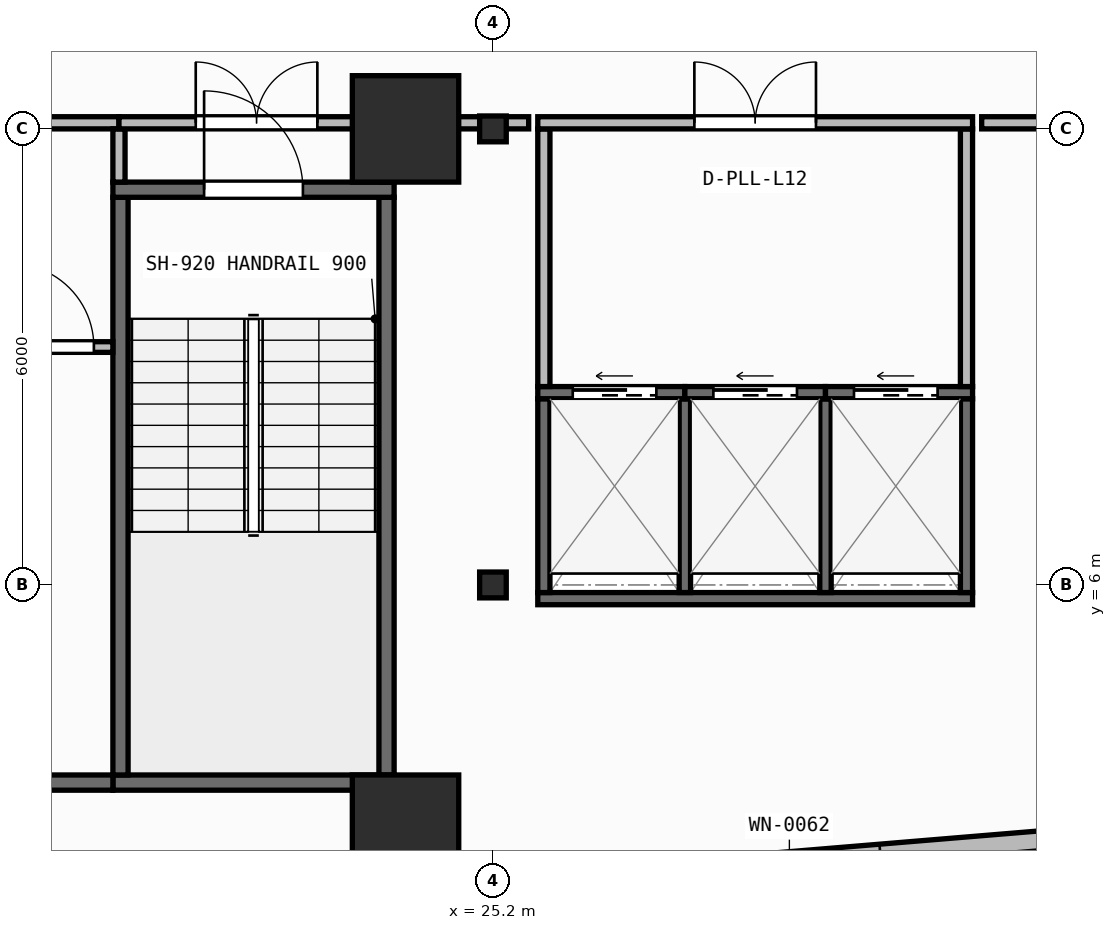
"""IFC4 building model, lengths in metres.
Left out: names, types, materials, properties, quantities, classifications, styles, units other than length and angle.
Written with IfcOpenShell. Run it as: python <this file> out.ifc"""

import sys

from ifc_helpers import new_model, si_unit, direction, frame, frame_2d, origin, origin_2d, place, context, subcontext, project, spatial, rectangle, i_section, extrude, element, fill, save


model = new_model("IFC4")
c1 = context("Model", 3, precision=1e-05, world=origin(), true_north=direction((0.0, 1.0)))
c2 = subcontext(c1, "Body", "Model", "MODEL_VIEW")
j1 = project(units=[si_unit("LENGTHUNIT", "METRE"), si_unit("PLANEANGLEUNIT", "RADIAN")], contexts=[c1])
p1 = place(None, origin())
s1 = spatial("IfcSite", under=j1, at=p1, CompositionType="ELEMENT")
p2 = place(p1, origin())
s2 = spatial("IfcBuilding", under=s1, at=p2, CompositionType="ELEMENT")
p3 = place(p2, frame((0.0, 0.0, 50.15)))
s3 = spatial("IfcBuildingStorey", under=s2, at=p3, CompositionType="ELEMENT", Elevation=50.15)
p4 = place(p3, frame((24.05, 2.8, 0.0), z_axis=(0.0, 0.0, 1.0), x_axis=(1.0, 0.0, 0.0)))
e1 = element("IfcColumn", 1, at=p4, inside=s3, PredefinedType="COLUMN", context=c2, shape_type="SweptSolid", body=[
    extrude(rectangle(XDim=1.4, YDim=1.4, at=origin_2d()), origin(), (0.0, 0.0, 1.0), 3.95),
])
p5 = place(p3, frame((25.2, 6.0, 0.0), z_axis=(0.0, 0.0, 1.0), x_axis=(1.0, 0.0, 0.0)))
e2 = element("IfcColumn", 2, at=p5, inside=s3, PredefinedType="COLUMN", context=c2, shape_type="SweptSolid", body=[
    extrude(i_section(OverallWidth=0.35, OverallDepth=0.34, WebThickness=0.016, FlangeThickness=0.028, at=origin_2d()), origin(), (0.0, 0.0, 1.0), 3.95),
])
p6 = place(p3, frame((24.05, 12.0, 0.0), z_axis=(0.0, 0.0, 1.0), x_axis=(1.0, 0.0, 0.0)))
e3 = element("IfcColumn", 3, at=p6, inside=s3, PredefinedType="COLUMN", context=c2, shape_type="SweptSolid", body=[
    extrude(rectangle(XDim=1.4, YDim=1.4, at=origin_2d()), origin(), (0.0, 0.0, 1.0), 3.95),
])
p7 = place(p3, frame((25.2, 12.0, 0.0), z_axis=(0.0, 0.0, 1.0), x_axis=(1.0, 0.0, 0.0)))
e4 = element("IfcColumn", 4, at=p7, inside=s3, PredefinedType="COLUMN", context=c2, shape_type="SweptSolid", body=[
    extrude(i_section(OverallWidth=0.35, OverallDepth=0.34, WebThickness=0.016, FlangeThickness=0.028, at=origin_2d()), origin(), (0.0, 0.0, 1.0), 3.95),
])
p8 = place(p3, frame((2.76, 0.174, 0.0), z_axis=(0.0, 0.0, 1.0), x_axis=(0.996571478456, 0.082736257641, 0.0)))
e5 = element("IfcWall", 5, at=p8, inside=s3, PredefinedType="STANDARD", context=c2, shape_type="SweptSolid", body=[
    extrude(rectangle(XDim=52.861, YDim=0.26, at=frame_2d((26.431, 0.0))), origin(), (0.0, 0.0, 1.0), 3.71),
])
p9 = place(p8, frame((25.231, 0.0, 0.9)))
e6 = element("IfcOpeningElement", 6, at=p9, cuts=e5, PredefinedType="OPENING", context=c2, shape_type="SweptSolid", body=[
    extrude(rectangle(XDim=2.4, YDim=1.65, at=frame_2d((1.2, 0.825))), frame((0.0, 0.14, 0.0), z_axis=(0.0, -1.0, 0.0), x_axis=(1.0, 0.0, 0.0)), (0.0, 0.0, 1.0), 0.28),
])
p10 = place(p3, frame((20.2, 3.4, 0.0), z_axis=(0.0, 0.0, 1.0), x_axis=(1.0, 0.0, 0.0)))
e7 = element("IfcWall", 7, at=p10, inside=s3, PredefinedType="SHEAR", context=c2, shape_type="SweptSolid", body=[
    extrude(rectangle(XDim=3.7, YDim=0.2, at=frame_2d((1.85, 0.0))), origin(), (0.0, 0.0, 1.0), 3.71),
])
for number, where, z_axis, x_axis in (
    (8, (20.3, 3.5, 0.0), (0.0, 0.0, 1.0), (0.0, 1.0, 0.0)),
    (9, (23.8, 3.5, 0.0), (0.0, 0.0, 1.0), (0.0, 1.0, 0.0)),
):
    element("IfcWall", number, at=place(p3, frame(where, z_axis=z_axis, x_axis=x_axis)), inside=s3, PredefinedType="SHEAR", context=c2, shape_type="SweptSolid", body=[
        extrude(rectangle(XDim=7.6, YDim=0.2, at=frame_2d((3.8, 0.0))), origin(), (0.0, 0.0, 1.0), 3.71),
    ])
p11 = place(p3, frame((20.2, 11.2, 0.0), z_axis=(0.0, 0.0, 1.0), x_axis=(1.0, 0.0, 0.0)))
e10 = element("IfcWall", 10, at=p11, inside=s3, PredefinedType="SHEAR", context=c2, shape_type="SweptSolid", body=[
    extrude(rectangle(XDim=3.7, YDim=0.2, at=frame_2d((1.85, 0.0))), origin(), (0.0, 0.0, 1.0), 3.71),
])
p12 = place(p11, frame((1.2, 0.0, 0.0)))
e11 = element("IfcOpeningElement", 11, at=p12, cuts=e10, PredefinedType="OPENING", context=c2, shape_type="SweptSolid", body=[
    extrude(rectangle(XDim=1.3, YDim=2.15, at=frame_2d((0.65, 1.075))), frame((0.0, 0.11, 0.0), z_axis=(0.0, -1.0, 0.0), x_axis=(1.0, 0.0, 0.0)), (0.0, 0.0, 1.0), 0.22),
])
p13 = place(p3, frame((6.5, 3.4, 0.0), z_axis=(0.0, 0.0, 1.0), x_axis=(1.0, 0.0, 0.0)))
e12 = element("IfcWall", 12, at=p13, inside=s3, PredefinedType="SHEAR", context=c2, shape_type="SweptSolid", body=[
    extrude(rectangle(XDim=13.7, YDim=0.2, at=frame_2d((6.85, 0.0))), origin(), (0.0, 0.0, 1.0), 3.71),
])
p14 = place(p3, frame((25.79, 5.82, 0.0), z_axis=(0.0, 0.0, 1.0), x_axis=(1.0, 0.0, 0.0)))
e13 = element("IfcWall", 13, at=p14, inside=s3, PredefinedType="SHEAR", context=c2, shape_type="SweptSolid", body=[
    extrude(rectangle(XDim=5.72, YDim=0.16, at=frame_2d((2.86, 0.0))), origin(), (0.0, 0.0, 1.0), 3.71),
])
for number, where, z_axis, x_axis in (
    (14, (25.87, 5.9, 0.0), (0.0, 0.0, 1.0), (0.0, 1.0, 0.0)),
    (15, (31.43, 5.9, 0.0), (0.0, 0.0, 1.0), (0.0, 1.0, 0.0)),
):
    element("IfcWall", number, at=place(p3, frame(where, z_axis=z_axis, x_axis=x_axis)), inside=s3, PredefinedType="SHEAR", context=c2, shape_type="SweptSolid", body=[
        extrude(rectangle(XDim=2.55, YDim=0.16, at=frame_2d((1.275, 0.0))), origin(), (0.0, 0.0, 1.0), 3.71),
    ])
for number, where, z_axis, x_axis in (
    (16, (27.725, 5.9, 0.0), (0.0, 0.0, 1.0), (0.0, 1.0, 0.0)),
    (17, (29.575, 5.9, 0.0), (0.0, 0.0, 1.0), (0.0, 1.0, 0.0)),
):
    element("IfcWall", number, at=place(p3, frame(where, z_axis=z_axis, x_axis=x_axis)), inside=s3, PredefinedType="SHEAR", context=c2, shape_type="SweptSolid", body=[
        extrude(rectangle(XDim=2.55, YDim=0.15, at=frame_2d((1.275, 0.0))), origin(), (0.0, 0.0, 1.0), 3.71),
    ])
p15 = place(p3, frame((25.79, 8.53, 0.0), z_axis=(0.0, 0.0, 1.0), x_axis=(1.0, 0.0, 0.0)))
e18 = element("IfcWall", 18, at=p15, inside=s3, PredefinedType="SHEAR", context=c2, shape_type="SweptSolid", body=[
    extrude(rectangle(XDim=1.935, YDim=0.16, at=frame_2d((0.968, 0.0))), origin(), (0.0, 0.0, 1.0), 3.71),
])
p16 = place(p15, frame((0.46, 0.0, 0.0)))
e19 = element("IfcOpeningElement", 19, at=p16, cuts=e18, PredefinedType="OPENING", context=c2, shape_type="SweptSolid", body=[
    extrude(rectangle(XDim=1.1, YDim=2.15, at=frame_2d((0.55, 1.075))), frame((0.0, 0.09, 0.0), z_axis=(0.0, -1.0, 0.0), x_axis=(1.0, 0.0, 0.0)), (0.0, 0.0, 1.0), 0.18),
])
p17 = place(p3, frame((27.725, 8.53, 0.0), z_axis=(0.0, 0.0, 1.0), x_axis=(1.0, 0.0, 0.0)))
e20 = element("IfcWall", 20, at=p17, inside=s3, PredefinedType="SHEAR", context=c2, shape_type="SweptSolid", body=[
    extrude(rectangle(XDim=1.85, YDim=0.16, at=frame_2d((0.925, 0.0))), origin(), (0.0, 0.0, 1.0), 3.71),
])
p18 = place(p17, frame((0.375, 0.0, 0.0)))
e21 = element("IfcOpeningElement", 21, at=p18, cuts=e20, PredefinedType="OPENING", context=c2, shape_type="SweptSolid", body=[
    extrude(rectangle(XDim=1.1, YDim=2.15, at=frame_2d((0.55, 1.075))), frame((0.0, 0.09, 0.0), z_axis=(0.0, -1.0, 0.0), x_axis=(1.0, 0.0, 0.0)), (0.0, 0.0, 1.0), 0.18),
])
p19 = place(p3, frame((29.575, 8.53, 0.0), z_axis=(0.0, 0.0, 1.0), x_axis=(1.0, 0.0, 0.0)))
e22 = element("IfcWall", 22, at=p19, inside=s3, PredefinedType="SHEAR", context=c2, shape_type="SweptSolid", body=[
    extrude(rectangle(XDim=1.935, YDim=0.16, at=frame_2d((0.968, 0.0))), origin(), (0.0, 0.0, 1.0), 3.71),
])
p20 = place(p19, frame((0.375, 0.0, 0.0)))
e23 = element("IfcOpeningElement", 23, at=p20, cuts=e22, PredefinedType="OPENING", context=c2, shape_type="SweptSolid", body=[
    extrude(rectangle(XDim=1.1, YDim=2.15, at=frame_2d((0.55, 1.075))), frame((0.0, 0.09, 0.0), z_axis=(0.0, -1.0, 0.0), x_axis=(1.0, 0.0, 0.0)), (0.0, 0.0, 1.0), 0.18),
])
p21 = place(p3, frame((18.61, 9.13, 0.0), z_axis=(0.0, 0.0, 1.0), x_axis=(1.0, 0.0, 0.0)))
e24 = element("IfcWall", 24, at=p21, inside=s3, PredefinedType="PARTITIONING", context=c2, shape_type="SweptSolid", body=[
    extrude(rectangle(XDim=1.59, YDim=0.14, at=frame_2d((0.795, 0.0))), origin(), (0.0, 0.0, 1.0), 3.71),
])
p22 = place(p21, frame((0.24, 0.0, 0.0)))
e25 = element("IfcOpeningElement", 25, at=p22, cuts=e24, PredefinedType="OPENING", context=c2, shape_type="SweptSolid", body=[
    extrude(rectangle(XDim=1.1, YDim=2.1, at=frame_2d((0.55, 1.05))), frame((0.0, 0.08, 0.0), z_axis=(0.0, -1.0, 0.0), x_axis=(1.0, 0.0, 0.0)), (0.0, 0.0, 1.0), 0.16),
])
p23 = place(p3, frame((12.58, 12.08, 0.0), z_axis=(0.0, 0.0, 1.0), x_axis=(1.0, 0.0, 0.0)))
e26 = element("IfcWall", 26, at=p23, inside=s3, PredefinedType="PARTITIONING", context=c2, shape_type="SweptSolid", body=[
    extrude(rectangle(XDim=7.7, YDim=0.16, at=frame_2d((3.85, 0.0))), origin(), (0.0, 0.0, 1.0), 3.073),
])
p24 = place(p23, frame((3.05, 0.0, 0.0)))
e27 = element("IfcOpeningElement", 27, at=p24, cuts=e26, PredefinedType="OPENING", context=c2, shape_type="SweptSolid", body=[
    extrude(rectangle(XDim=1.6, YDim=2.05, at=frame_2d((0.8, 1.025))), frame((0.0, 0.09, 0.0), z_axis=(0.0, -1.0, 0.0), x_axis=(1.0, 0.0, 0.0)), (0.0, 0.0, 1.0), 0.18),
])
p25 = place(p3, frame((20.28, 11.3, 0.0), z_axis=(0.0, 0.0, 1.0), x_axis=(0.0, 1.0, 0.0)))
e28 = element("IfcWall", 28, at=p25, inside=s3, PredefinedType="PARTITIONING", context=c2, shape_type="SweptSolid", body=[
    extrude(rectangle(XDim=0.7, YDim=0.16, at=frame_2d((0.35, 0.0))), origin(), (0.0, 0.0, 1.0), 3.71),
])
p26 = place(p3, frame((20.28, 12.08, 0.0), z_axis=(0.0, 0.0, 1.0), x_axis=(1.0, 0.0, 0.0)))
e29 = element("IfcWall", 29, at=p26, inside=s3, PredefinedType="PARTITIONING", context=c2, shape_type="SweptSolid", body=[
    extrude(rectangle(XDim=3.62, YDim=0.16, at=frame_2d((1.81, 0.0))), origin(), (0.0, 0.0, 1.0), 3.073),
])
p27 = place(p26, frame((1.01, 0.0, 0.0)))
e30 = element("IfcOpeningElement", 30, at=p27, cuts=e29, PredefinedType="OPENING", context=c2, shape_type="SweptSolid", body=[
    extrude(rectangle(XDim=1.6, YDim=2.05, at=frame_2d((0.8, 1.025))), frame((0.0, 0.09, 0.0), z_axis=(0.0, -1.0, 0.0), x_axis=(1.0, 0.0, 0.0)), (0.0, 0.0, 1.0), 0.18),
])
p28 = place(p3, frame((23.82, 11.3, 0.0), z_axis=(0.0, 0.0, 1.0), x_axis=(0.0, 1.0, 0.0)))
e31 = element("IfcWall", 31, at=p28, inside=s3, PredefinedType="PARTITIONING", context=c2, shape_type="SweptSolid", body=[
    extrude(rectangle(XDim=0.7, YDim=0.16, at=frame_2d((0.35, 0.0))), origin(), (0.0, 0.0, 1.0), 3.71),
])
for number, where, z_axis, x_axis in (
    (32, (25.87, 8.61, 0.0), (0.0, 0.0, 1.0), (0.0, 1.0, 0.0)),
    (33, (31.43, 8.61, 0.0), (0.0, 0.0, 1.0), (0.0, 1.0, 0.0)),
):
    element("IfcWall", number, at=place(p3, frame(where, z_axis=z_axis, x_axis=x_axis)), inside=s3, PredefinedType="PARTITIONING", context=c2, shape_type="SweptSolid", body=[
        extrude(rectangle(XDim=3.39, YDim=0.16, at=frame_2d((1.695, 0.0))), origin(), (0.0, 0.0, 1.0), 3.71),
    ])
p29 = place(p3, frame((25.79, 12.08, 0.0), z_axis=(0.0, 0.0, 1.0), x_axis=(1.0, 0.0, 0.0)))
e34 = element("IfcWall", 34, at=p29, inside=s3, PredefinedType="PARTITIONING", context=c2, shape_type="SweptSolid", body=[
    extrude(rectangle(XDim=5.72, YDim=0.16, at=frame_2d((2.86, 0.0))), origin(), (0.0, 0.0, 1.0), 3.073),
])
p30 = place(p29, frame((2.06, 0.0, 0.0)))
e35 = element("IfcOpeningElement", 35, at=p30, cuts=e34, PredefinedType="OPENING", context=c2, shape_type="SweptSolid", body=[
    extrude(rectangle(XDim=1.6, YDim=2.05, at=frame_2d((0.8, 1.025))), frame((0.0, 0.09, 0.0), z_axis=(0.0, -1.0, 0.0), x_axis=(1.0, 0.0, 0.0)), (0.0, 0.0, 1.0), 0.18),
])
p31 = place(p3, frame((24.02, 12.08, 0.0), z_axis=(0.0, 0.0, 1.0), x_axis=(1.0, 0.0, 0.0)))
e36 = element("IfcWall", 36, at=p31, inside=s3, PredefinedType="PARTITIONING", context=c2, shape_type="SweptSolid", body=[
    extrude(rectangle(XDim=1.65, YDim=0.16, at=frame_2d((0.825, 0.0))), origin(), (0.0, 0.0, 1.0), 3.073),
])
p32 = place(p3, frame((31.63, 12.08, 0.0), z_axis=(0.0, 0.0, 1.0), x_axis=(1.0, 0.0, 0.0)))
e37 = element("IfcWall", 37, at=p32, inside=s3, PredefinedType="PARTITIONING", context=c2, shape_type="SweptSolid", body=[
    extrude(rectangle(XDim=11.181, YDim=0.16, at=frame_2d((5.59, 0.0))), origin(), (0.0, 0.0, 1.0), 3.073),
])
p33 = place(p12, origin())
e38 = element("IfcDoor", 38, at=p33, inside=s3, OperationType="SINGLE_SWING_LEFT", PredefinedType="DOOR", context=c2, shape_type="SweptSolid", body=[
    extrude(rectangle(XDim=1.3, YDim=2.15, at=frame_2d((0.65, 1.075))), frame((0.0, 0.025, 0.0), z_axis=(0.0, -1.0, 0.0), x_axis=(1.0, 0.0, 0.0)), (0.0, 0.0, 1.0), 0.05),
])
fill(e11, e38)
p34 = place(p16, origin())
e39 = element("IfcDoor", 39, at=p34, inside=s3, OperationType="SLIDING_TO_LEFT", PredefinedType="DOOR", context=c2, shape_type="SweptSolid", body=[
    extrude(rectangle(XDim=1.1, YDim=2.15, at=frame_2d((0.55, 1.075))), frame((0.0, 0.025, 0.0), z_axis=(0.0, -1.0, 0.0), x_axis=(1.0, 0.0, 0.0)), (0.0, 0.0, 1.0), 0.05),
])
fill(e19, e39)
p35 = place(p18, origin())
e40 = element("IfcDoor", 40, at=p35, inside=s3, OperationType="SLIDING_TO_LEFT", PredefinedType="DOOR", context=c2, shape_type="SweptSolid", body=[
    extrude(rectangle(XDim=1.1, YDim=2.15, at=frame_2d((0.55, 1.075))), frame((0.0, 0.025, 0.0), z_axis=(0.0, -1.0, 0.0), x_axis=(1.0, 0.0, 0.0)), (0.0, 0.0, 1.0), 0.05),
])
fill(e21, e40)
p36 = place(p20, origin())
e41 = element("IfcDoor", 41, at=p36, inside=s3, OperationType="SLIDING_TO_LEFT", PredefinedType="DOOR", context=c2, shape_type="SweptSolid", body=[
    extrude(rectangle(XDim=1.1, YDim=2.15, at=frame_2d((0.55, 1.075))), frame((0.0, 0.025, 0.0), z_axis=(0.0, -1.0, 0.0), x_axis=(1.0, 0.0, 0.0)), (0.0, 0.0, 1.0), 0.05),
])
fill(e23, e41)
p37 = place(p22, origin())
e42 = element("IfcDoor", 42, at=p37, inside=s3, OperationType="SINGLE_SWING_LEFT", PredefinedType="DOOR", context=c2, shape_type="SweptSolid", body=[
    extrude(rectangle(XDim=1.1, YDim=2.1, at=frame_2d((0.55, 1.05))), frame((0.0, 0.025, 0.0), z_axis=(0.0, -1.0, 0.0), x_axis=(1.0, 0.0, 0.0)), (0.0, 0.0, 1.0), 0.05),
])
fill(e25, e42)
p38 = place(p27, origin())
e43 = element("IfcDoor", 43, at=p38, inside=s3, OperationType="DOUBLE_DOOR_SINGLE_SWING", PredefinedType="DOOR", context=c2, shape_type="SweptSolid", body=[
    extrude(rectangle(XDim=1.6, YDim=2.05, at=frame_2d((0.8, 1.025))), frame((0.0, 0.025, 0.0), z_axis=(0.0, -1.0, 0.0), x_axis=(1.0, 0.0, 0.0)), (0.0, 0.0, 1.0), 0.05),
])
fill(e30, e43)
p39 = place(p30, origin())
e44 = element("IfcDoor", 44, at=p39, inside=s3, OperationType="DOUBLE_DOOR_SINGLE_SWING", PredefinedType="DOOR", context=c2, shape_type="SweptSolid", body=[
    extrude(rectangle(XDim=1.6, YDim=2.05, at=frame_2d((0.8, 1.025))), frame((0.0, 0.025, 0.0), z_axis=(0.0, -1.0, 0.0), x_axis=(1.0, 0.0, 0.0)), (0.0, 0.0, 1.0), 0.05),
])
fill(e35, e44)
save(model, sys.argv[1])
